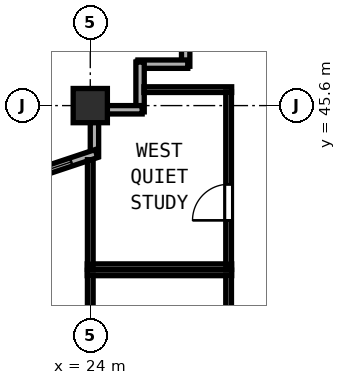
"""IFC4 building model, lengths in metres.
Left out: names, types, materials, properties, quantities, classifications, styles, units other than length and angle.
Written with IfcOpenShell. Run it as: python <this file> out.ifc"""

import sys

from ifc_helpers import new_model, si_unit, direction, frame, frame_2d, origin, origin_2d, place, context, subcontext, project, spatial, rectangle, hollow_rectangle, extrude, element, fill, save


model = new_model("IFC4")
c1 = context("Model", 3, precision=1e-05, world=origin(), true_north=direction((0.0, 1.0)))
c2 = subcontext(c1, "Body", "Model", "MODEL_VIEW")
j1 = project(units=[si_unit("LENGTHUNIT", "METRE"), si_unit("PLANEANGLEUNIT", "RADIAN")], contexts=[c1])
p1 = place(None, origin())
s1 = spatial("IfcSite", under=j1, at=p1, CompositionType="ELEMENT")
p2 = place(p1, origin())
s2 = spatial("IfcBuilding", under=s1, at=p2, CompositionType="ELEMENT")
p3 = place(p2, frame((0.0, 0.0, 215.4)))
s3 = spatial("IfcBuildingStorey", under=s2, at=p3, CompositionType="ELEMENT", Elevation=215.4)
p4 = place(p3, frame((24.0, 45.6, 0.0), z_axis=(0.0, 0.0, 1.0), x_axis=(1.0, 0.0, 0.0)))
e1 = element("IfcColumn", 1, at=p4, inside=s3, PredefinedType="COLUMN", context=c2, shape_type="SweptSolid", body=[
    extrude(hollow_rectangle(XDim=0.9, YDim=0.9, WallThickness=0.034, at=origin_2d()), origin(), (0.0, 0.0, 1.0), 3.8),
])
p5 = place(p3, frame((26.51, 48.0, 0.0), z_axis=(0.0, 0.0, 1.0), x_axis=(0.0, -1.0, 0.0)))
e2 = element("IfcWall", 2, at=p5, inside=s3, PredefinedType="SOLIDWALL", context=c2, shape_type="SweptSolid", body=[
    extrude(rectangle(XDim=1.365, YDim=0.22, at=frame_2d((0.683, 0.0))), origin(), (0.0, 0.0, 1.0), 3.62),
])
for number, where, z_axis, x_axis in (
    (3, (26.565, 46.69, 0.0), (0.0, 0.0, 1.0), (-1.0, 0.0, 0.0)),
    (4, (25.31, 46.745, 0.0), (0.0, 0.0, 1.0), (0.0, -1.0, 0.0)),
):
    element("IfcWall", number, at=place(p3, frame(where, z_axis=z_axis, x_axis=x_axis)), inside=s3, PredefinedType="SOLIDWALL", context=c2, shape_type="SweptSolid", body=[
        extrude(rectangle(XDim=1.31, YDim=0.22, at=frame_2d((0.655, 0.0))), origin(), (0.0, 0.0, 1.0), 3.62),
    ])
p6 = place(p3, frame((25.365, 45.49, 0.0), z_axis=(0.0, 0.0, 1.0), x_axis=(-1.0, 0.0, 0.0)))
e5 = element("IfcWall", 5, at=p6, inside=s3, PredefinedType="SOLIDWALL", context=c2, shape_type="SweptSolid", body=[
    extrude(rectangle(XDim=0.923, YDim=0.22, at=frame_2d((0.461, 0.0))), origin(), (0.0, 0.0, 1.0), 3.62),
])
p7 = place(p3, frame((24.11, 45.158, 0.0), z_axis=(0.0, 0.0, 1.0), x_axis=(0.0, -1.0, 0.0)))
e6 = element("IfcWall", 6, at=p7, inside=s3, PredefinedType="SOLIDWALL", context=c2, shape_type="SweptSolid", body=[
    extrude(rectangle(XDim=0.892, YDim=0.22, at=frame_2d((0.446, 0.0))), origin(), (0.0, 0.0, 1.0), 3.215),
])
p8 = place(p3, frame((24.162, 44.338, 0.0), z_axis=(0.0, 0.0, 1.0), x_axis=(-0.948687265055, -0.316215864755, 0.0)))
e7 = element("IfcWall", 7, at=p8, inside=s3, PredefinedType="SOLIDWALL", context=c2, shape_type="SweptSolid", body=[
    extrude(rectangle(XDim=6.154, YDim=0.22, at=frame_2d((3.077, 0.0))), origin(), (0.0, 0.0, 1.0), 3.215),
])
p9 = place(p8, frame((0.7, 0.0, 0.85)))
e8 = element("IfcOpeningElement", 8, at=p9, cuts=e7, PredefinedType="OPENING", context=c2, shape_type="SweptSolid", body=[
    extrude(rectangle(XDim=1.1, YDim=1.75, at=frame_2d((0.55, 0.875))), frame((0.0, 0.12, 0.0), z_axis=(0.0, -1.0, 0.0), x_axis=(1.0, 0.0, 0.0)), (0.0, 0.0, 1.0), 0.24),
])
p10 = place(p3, frame((23.92, 41.2, 0.0), z_axis=(0.0, 0.0, 1.0), x_axis=(1.0, 0.0, 0.0)))
e9 = element("IfcWall", 9, at=p10, inside=s3, PredefinedType="PARTITIONING", context=c2, shape_type="SweptSolid", body=[
    extrude(rectangle(XDim=3.8, YDim=0.15, at=frame_2d((1.9, 0.0))), origin(), (0.0, 0.0, 1.0), 3.62),
])
p11 = place(p3, frame((24.0, 33.06, 0.0), z_axis=(0.0, 0.0, 1.0), x_axis=(0.0, 1.0, 0.0)))
e10 = element("IfcWall", 10, at=p11, inside=s3, PredefinedType="PARTITIONING", context=c2, shape_type="SweptSolid", body=[
    extrude(rectangle(XDim=8.08, YDim=0.15, at=frame_2d((4.04, 0.0))), origin(), (0.0, 0.0, 1.0), 3.215),
])
p12 = place(p3, frame((27.64, 33.06, 0.0), z_axis=(0.0, 0.0, 1.0), x_axis=(0.0, 1.0, 0.0)))
e11 = element("IfcWall", 11, at=p12, inside=s3, PredefinedType="PARTITIONING", context=c2, shape_type="SweptSolid", body=[
    extrude(rectangle(XDim=8.08, YDim=0.15, at=frame_2d((4.04, 0.0))), origin(), (0.0, 0.0, 1.0), 3.62),
])
p13 = place(p12, frame((3.61, 0.0, 0.0), z_axis=(0.0, 0.0, 1.0), x_axis=(-1.0, 0.0, 0.0)))
e12 = element("IfcOpeningElement", 12, at=p13, cuts=e11, PredefinedType="OPENING", context=c2, shape_type="SweptSolid", body=[
    extrude(rectangle(XDim=0.95, YDim=2.12, at=frame_2d((0.475, 1.06))), frame((0.0, 0.085, 0.0), z_axis=(0.0, -1.0, 0.0), x_axis=(1.0, 0.0, 0.0)), (0.0, 0.0, 1.0), 0.17),
])
p14 = place(p3, frame((25.412, 46.02, 0.0), z_axis=(0.0, 0.0, 1.0), x_axis=(1.0, 0.0, 0.0)))
e13 = element("IfcWall", 13, at=p14, inside=s3, PredefinedType="PARTITIONING", context=c2, shape_type="SweptSolid", body=[
    extrude(rectangle(XDim=2.308, YDim=0.15, at=frame_2d((1.154, 0.0))), origin(), (0.0, 0.0, 1.0), 3.62),
])
p15 = place(p3, frame((23.92, 41.36, 0.0), z_axis=(0.0, 0.0, 1.0), x_axis=(1.0, 0.0, 0.0)))
e14 = element("IfcWall", 14, at=p15, inside=s3, PredefinedType="PARTITIONING", context=c2, shape_type="SweptSolid", body=[
    extrude(rectangle(XDim=3.8, YDim=0.15, at=frame_2d((1.9, 0.0))), origin(), (0.0, 0.0, 1.0), 3.62),
])
p16 = place(p3, frame((24.0, 41.42, 0.0), z_axis=(0.0, 0.0, 1.0), x_axis=(0.0, 1.0, 0.0)))
e15 = element("IfcWall", 15, at=p16, inside=s3, PredefinedType="PARTITIONING", context=c2, shape_type="SweptSolid", body=[
    extrude(rectangle(XDim=2.757, YDim=0.15, at=frame_2d((1.378, 0.0))), origin(), (0.0, 0.0, 1.0), 3.215),
])
p17 = place(p3, frame((27.64, 41.42, 0.0), z_axis=(0.0, 0.0, 1.0), x_axis=(0.0, 1.0, 0.0)))
e16 = element("IfcWall", 16, at=p17, inside=s3, PredefinedType="PARTITIONING", context=c2, shape_type="SweptSolid", body=[
    extrude(rectangle(XDim=4.54, YDim=0.15, at=frame_2d((2.27, 0.0))), origin(), (0.0, 0.0, 1.0), 3.62),
])
p18 = place(p17, frame((2.11, 0.0, 0.0), z_axis=(0.0, 0.0, 1.0), x_axis=(-1.0, 0.0, 0.0)))
e17 = element("IfcOpeningElement", 17, at=p18, cuts=e16, PredefinedType="OPENING", context=c2, shape_type="SweptSolid", body=[
    extrude(rectangle(XDim=0.95, YDim=2.12, at=frame_2d((0.475, 1.06))), frame((0.0, 0.085, 0.0), z_axis=(0.0, -1.0, 0.0), x_axis=(1.0, 0.0, 0.0)), (0.0, 0.0, 1.0), 0.17),
])
p19 = place(p9, origin())
e18 = element("IfcWindow", 18, at=p19, inside=s3, PartitioningType="SINGLE_PANEL", PredefinedType="WINDOW", context=c2, shape_type="SweptSolid", body=[
    extrude(rectangle(XDim=1.1, YDim=1.75, at=frame_2d((0.55, 0.875))), frame((0.0, 0.03, 0.0), z_axis=(0.0, -1.0, 0.0), x_axis=(1.0, 0.0, 0.0)), (0.0, 0.0, 1.0), 0.06),
])
fill(e8, e18)
p20 = place(p18, origin())
e19 = element("IfcDoor", 19, at=p20, inside=s3, OperationType="SINGLE_SWING_RIGHT", PredefinedType="DOOR", context=c2, shape_type="SweptSolid", body=[
    extrude(rectangle(XDim=0.95, YDim=2.12, at=frame_2d((0.475, 1.06))), frame((0.0, 0.025, 0.0), z_axis=(0.0, -1.0, 0.0), x_axis=(1.0, 0.0, 0.0)), (0.0, 0.0, 1.0), 0.05),
])
fill(e17, e19)
save(model, sys.argv[1])
